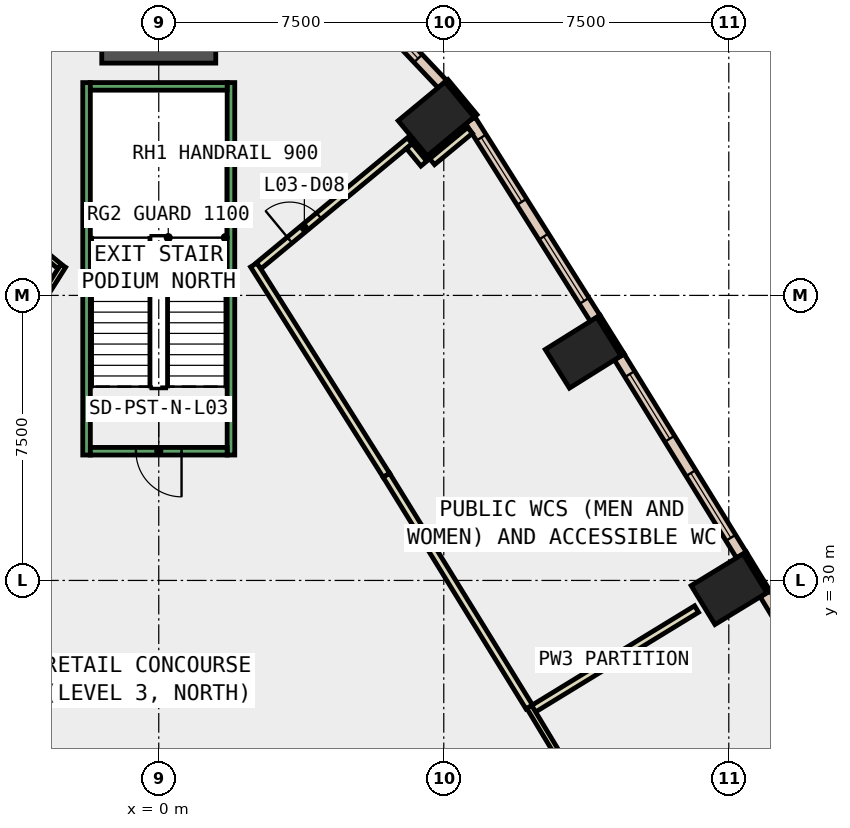
"""IFC4 building model, lengths in metres.
Left out: names, types, materials, properties, quantities, classifications, styles, units other than length and angle.
Written with IfcOpenShell. Run it as: python <this file> out.ifc"""

import sys

from ifc_helpers import new_model, si_unit, direction, frame, frame_2d, origin, origin_2d, place, context, subcontext, project, spatial, rectangle, extrude, element, fill, save


model = new_model("IFC4")
c1 = context("Model", 3, precision=1e-05, world=origin(), true_north=direction((0.0, 1.0)))
c2 = subcontext(c1, "Body", "Model", "MODEL_VIEW")
j1 = project(units=[si_unit("LENGTHUNIT", "METRE"), si_unit("PLANEANGLEUNIT", "RADIAN")], contexts=[c1])
p1 = place(None, origin())
s1 = spatial("IfcSite", under=j1, at=p1, CompositionType="ELEMENT")
p2 = place(p1, origin())
s2 = spatial("IfcBuilding", under=s1, at=p2, CompositionType="ELEMENT")
p3 = place(p2, frame((0.0, 0.0, 20.0)))
s3 = spatial("IfcBuildingStorey", under=s2, at=p3, CompositionType="ELEMENT", Elevation=20.0)
for number, where, z_axis, x_axis in (
    (1, (15.005, 29.769, -0.45), (0.0, 0.0, 1.0), (-0.522, 0.853, 0.0)),
    (2, (11.167, 35.993, -0.45), (0.0, 0.0, 1.0), (-0.53, 0.848, 0.0)),
    (3, (7.299, 42.144, -0.45), (0.0, 0.0, 1.0), (-0.638, 0.77, 0.0)),
):
    element("IfcColumn", number, at=place(p3, frame(where, z_axis=z_axis, x_axis=x_axis)), inside=s3, PredefinedType="COLUMN", context=c2, shape_type="SweptSolid", body=[
        extrude(rectangle(XDim=1.2, YDim=1.6, at=origin_2d()), origin(), (0.0, 0.0, 1.0), 5.0),
    ])
p4 = place(p3, frame((0.0, 45.112, -0.45), z_axis=(0.0, 0.0, 1.0), x_axis=(0.0, 1.0, 0.0)))
e4 = element("IfcColumn", 4, at=p4, inside=s3, PredefinedType="COLUMN", context=c2, shape_type="SweptSolid", body=[
    extrude(rectangle(XDim=3.0, YDim=3.0, at=origin_2d()), origin(), (0.0, 0.0, 1.0), 5.0),
])
p5 = place(p3, frame((16.043, 29.7, 0.0), z_axis=(0.0, 0.0, 1.0), x_axis=(-0.521507599072, 0.853246637327, 0.0)))
e5 = element("IfcWall", 5, at=p5, inside=s3, PredefinedType="STANDARD", context=c2, shape_type="SweptSolid", body=[
    extrude(rectangle(XDim=1.2, YDim=0.1, at=frame_2d((0.6, 0.0))), origin(), (0.0, 0.0, 1.0), 4.55),
])
for number, where, z_axis, x_axis in (
    (6, (12.206, 35.935, 0.0), (0.0, 0.0, 1.0), (-0.53, 0.848, 0.0)),
    (7, (8.336, 42.224, 0.0), (0.0, 0.0, 1.0), (-0.638, 0.77, 0.0)),
):
    element("IfcWall", number, at=place(p3, frame(where, z_axis=z_axis, x_axis=x_axis)), inside=s3, PredefinedType="STANDARD", context=c2, shape_type="SweptSolid", body=[
        extrude(rectangle(XDim=1.199, YDim=0.1, at=frame_2d((0.6, 0.0))), origin(), (0.0, 0.0, 1.0), 4.55),
    ])
p6 = place(p3, frame((19.117, 24.406, 0.0), z_axis=(0.0, 0.0, 1.0), x_axis=(-0.516687651362, 0.85617397235, 0.0)))
e8 = element("IfcWall", 8, at=p6, inside=s3, PredefinedType="STANDARD", context=c2, shape_type="SweptSolid", body=[
    extrude(rectangle(XDim=6.121, YDim=0.3, at=frame_2d((3.061, 0.0))), origin(), (0.0, 0.0, 1.0), 4.55),
])
p7 = place(p6, frame((0.53, 0.0, 1.0)))
e9 = element("IfcOpeningElement", 9, at=p7, cuts=e8, PredefinedType="OPENING", context=c2, shape_type="SweptSolid", body=[
    extrude(rectangle(XDim=2.0, YDim=3.2, at=frame_2d((1.0, 1.6))), frame((0.0, 0.16, 0.0), z_axis=(0.0, -1.0, 0.0), x_axis=(1.0, 0.0, 0.0)), (0.0, 0.0, 1.0), 0.32),
])
p8 = place(p6, frame((3.591, 0.0, 1.0)))
e10 = element("IfcOpeningElement", 10, at=p8, cuts=e8, PredefinedType="OPENING", context=c2, shape_type="SweptSolid", body=[
    extrude(rectangle(XDim=2.0, YDim=3.2, at=frame_2d((1.0, 1.6))), frame((0.0, 0.16, 0.0), z_axis=(0.0, -1.0, 0.0), x_axis=(1.0, 0.0, 0.0)), (0.0, 0.0, 1.0), 0.32),
])
p9 = place(p3, frame((15.331, 30.67, 0.0), z_axis=(0.0, 0.0, 1.0), x_axis=(-0.524953701886, 0.85113078365, 0.0)))
e11 = element("IfcWall", 11, at=p9, inside=s3, PredefinedType="STANDARD", context=c2, shape_type="SweptSolid", body=[
    extrude(rectangle(XDim=6.123, YDim=0.3, at=frame_2d((3.061, 0.0))), origin(), (0.0, 0.0, 1.0), 4.55),
])
p10 = place(p9, frame((0.531, 0.0, 1.0)))
e12 = element("IfcOpeningElement", 12, at=p10, cuts=e11, PredefinedType="OPENING", context=c2, shape_type="SweptSolid", body=[
    extrude(rectangle(XDim=2.0, YDim=3.2, at=frame_2d((1.0, 1.6))), frame((0.0, 0.16, 0.0), z_axis=(0.0, -1.0, 0.0), x_axis=(1.0, 0.0, 0.0)), (0.0, 0.0, 1.0), 0.32),
])
p11 = place(p9, frame((3.592, 0.0, 1.0)))
e13 = element("IfcOpeningElement", 13, at=p11, cuts=e11, PredefinedType="OPENING", context=c2, shape_type="SweptSolid", body=[
    extrude(rectangle(XDim=2.0, YDim=3.2, at=frame_2d((1.0, 1.6))), frame((0.0, 0.16, 0.0), z_axis=(0.0, -1.0, 0.0), x_axis=(1.0, 0.0, 0.0)), (0.0, 0.0, 1.0), 0.32),
])
p12 = place(p3, frame((11.483, 36.897, 0.0), z_axis=(0.0, 0.0, 1.0), x_axis=(-0.53304020879, 0.846089910006, 0.0)))
e14 = element("IfcWall", 14, at=p12, inside=s3, PredefinedType="STANDARD", context=c2, shape_type="SweptSolid", body=[
    extrude(rectangle(XDim=6.163, YDim=0.3, at=frame_2d((3.081, 0.0))), origin(), (0.0, 0.0, 1.0), 4.55),
])
p13 = place(p12, frame((0.541, 0.0, 1.0)))
e15 = element("IfcOpeningElement", 15, at=p13, cuts=e14, PredefinedType="OPENING", context=c2, shape_type="SweptSolid", body=[
    extrude(rectangle(XDim=2.0, YDim=3.2, at=frame_2d((1.0, 1.6))), frame((0.0, 0.16, 0.0), z_axis=(0.0, -1.0, 0.0), x_axis=(1.0, 0.0, 0.0)), (0.0, 0.0, 1.0), 0.32),
])
p14 = place(p12, frame((3.622, 0.0, 1.0)))
e16 = element("IfcOpeningElement", 16, at=p14, cuts=e14, PredefinedType="OPENING", context=c2, shape_type="SweptSolid", body=[
    extrude(rectangle(XDim=2.0, YDim=3.2, at=frame_2d((1.0, 1.6))), frame((0.0, 0.16, 0.0), z_axis=(0.0, -1.0, 0.0), x_axis=(1.0, 0.0, 0.0)), (0.0, 0.0, 1.0), 0.32),
])
p15 = place(p3, frame((7.464, 43.058, 0.0), z_axis=(0.0, 0.0, 1.0), x_axis=(-0.687081126245, 0.726580708495, 0.0)))
e17 = element("IfcWall", 17, at=p15, inside=s3, PredefinedType="STANDARD", context=c2, shape_type="SweptSolid", body=[
    extrude(rectangle(XDim=3.461, YDim=0.3, at=frame_2d((1.73, 0.0))), origin(), (0.0, 0.0, 1.0), 4.55),
])
p16 = place(p15, frame((0.931, 0.0, 1.0)))
e18 = element("IfcOpeningElement", 18, at=p16, cuts=e17, PredefinedType="OPENING", context=c2, shape_type="SweptSolid", body=[
    extrude(rectangle(XDim=1.6, YDim=3.2, at=frame_2d((0.8, 1.6))), frame((0.0, 0.16, 0.0), z_axis=(0.0, -1.0, 0.0), x_axis=(1.0, 0.0, 0.0)), (0.0, 0.0, 1.0), 0.32),
])
p17 = place(p3, frame((9.801, 26.587, 0.0), z_axis=(0.0, 0.0, 1.0), x_axis=(0.853180048432, 0.521616530564, 0.0)))
e19 = element("IfcWall", 19, at=p17, inside=s3, PredefinedType="PARTITIONING", context=c2, shape_type="SweptSolid", body=[
    extrude(rectangle(XDim=5.1, YDim=0.2, at=frame_2d((2.55, 0.0))), origin(), (0.0, 0.0, 1.0), 4.55),
])
p18 = place(p3, frame((13.544, 20.382, 0.0), z_axis=(0.0, 0.0, 1.0), x_axis=(-0.516527204033, 0.856270779306, 0.0)))
e20 = element("IfcWall", 20, at=p18, inside=s3, PredefinedType="PARTITIONING", context=c2, shape_type="SweptSolid", body=[
    extrude(rectangle(XDim=7.347, YDim=0.15, at=frame_2d((3.673, 0.0))), origin(), (0.0, 0.0, 1.0), 4.55),
])
p19 = place(p3, frame((5.99, 32.767, 0.0), z_axis=(0.0, 0.0, 1.0), x_axis=(-0.533258548208, 0.845952315892, 0.0)))
e21 = element("IfcWall", 21, at=p19, inside=s3, PredefinedType="PARTITIONING", context=c2, shape_type="SweptSolid", body=[
    extrude(rectangle(XDim=6.543, YDim=0.2, at=frame_2d((3.271, 0.0))), origin(), (0.0, 0.0, 1.0), 4.55),
])
p20 = place(p3, frame((2.631, 38.281, 0.0), z_axis=(0.0, 0.0, 1.0), x_axis=(0.770346235272, 0.637625813312, 0.0)))
e22 = element("IfcWall", 22, at=p20, inside=s3, PredefinedType="PARTITIONING", context=c2, shape_type="SweptSolid", body=[
    extrude(rectangle(XDim=5.16, YDim=0.2, at=frame_2d((2.58, 0.0))), origin(), (0.0, 0.0, 1.0), 4.55),
])
p21 = place(p20, frame((1.058, 0.0, 0.0)))
e23 = element("IfcOpeningElement", 23, at=p21, cuts=e22, PredefinedType="OPENING", context=c2, shape_type="SweptSolid", body=[
    extrude(rectangle(XDim=1.0, YDim=2.1, at=frame_2d((0.5, 1.05))), frame((0.0, 0.11, 0.0), z_axis=(0.0, -1.0, 0.0), x_axis=(1.0, 0.0, 0.0)), (0.0, 0.0, 1.0), 0.22),
])
p22 = place(p3, frame((6.593, 41.43, 0.0), z_axis=(0.0, 0.0, 1.0), x_axis=(0.636576557089, -0.771213515808, 0.0)))
e24 = element("IfcWall", 24, at=p22, inside=s3, PredefinedType="PARTITIONING", context=c2, shape_type="SweptSolid", body=[
    extrude(rectangle(XDim=0.6, YDim=0.2, at=frame_2d((0.3, 0.0))), origin(), (0.0, 0.0, 1.0), 4.55),
])
p23 = place(p3, frame((7.193, 41.018, 0.0), z_axis=(0.0, 0.0, 1.0), x_axis=(0.77046149962, 0.637486531311, 0.0)))
e25 = element("IfcWall", 25, at=p23, inside=s3, PredefinedType="PARTITIONING", context=c2, shape_type="SweptSolid", body=[
    extrude(rectangle(XDim=1.292, YDim=0.2, at=frame_2d((0.646, 0.0))), origin(), (0.0, 0.0, 1.0), 4.55),
])
p24 = place(p3, frame((9.748, 26.672, 0.0), z_axis=(0.0, 0.0, 1.0), x_axis=(-0.52483723921, 0.851202603578, 0.0)))
e26 = element("IfcWall", 26, at=p24, inside=s3, PredefinedType="PARTITIONING", context=c2, shape_type="SweptSolid", body=[
    extrude(rectangle(XDim=7.16, YDim=0.2, at=frame_2d((3.58, 0.0))), origin(), (0.0, 0.0, 1.0), 4.55),
])
p25 = place(p3, frame((-2.514, 38.28, 0.0), z_axis=(0.0, 0.0, 1.0), x_axis=(-0.533358613661, -0.845889229884, 0.0)))
e27 = element("IfcWall", 27, at=p25, inside=s3, PredefinedType="PARTITIONING", context=c2, shape_type="SweptSolid", body=[
    extrude(rectangle(XDim=6.517, YDim=0.15, at=frame_2d((3.259, 0.0))), origin(), (0.0, 0.0, 1.0), 4.55),
])
p26 = place(p3, frame((-6.667, 41.621, 0.0), z_axis=(0.0, 0.0, 1.0), x_axis=(0.770357397594, -0.637612327336, 0.0)))
e28 = element("IfcWall", 28, at=p26, inside=s3, PredefinedType="PARTITIONING", context=c2, shape_type="SweptSolid", body=[
    extrude(rectangle(XDim=5.264, YDim=0.15, at=frame_2d((2.632, 0.0))), origin(), (0.0, 0.0, 1.0), 4.55),
])
p27 = place(p26, frame((0.1, 0.0, 0.0)))
e29 = element("IfcOpeningElement", 29, at=p27, cuts=e28, PredefinedType="OPENING", context=c2, shape_type="SweptSolid", body=[
    extrude(rectangle(XDim=1.8, YDim=2.1, at=frame_2d((0.9, 1.05))), frame((0.0, 0.085, 0.0), z_axis=(0.0, -1.0, 0.0), x_axis=(1.0, 0.0, 0.0)), (0.0, 0.0, 1.0), 0.17),
])
for number, where, z_axis, x_axis in (
    (30, (1.9, 33.3, 0.0), (0.0, 0.0, 1.0), (0.0, 1.0, 0.0)),
    (31, (-1.9, 33.3, 0.0), (0.0, 0.0, 1.0), (0.0, 1.0, 0.0)),
):
    element("IfcWall", number, at=place(p3, frame(where, z_axis=z_axis, x_axis=x_axis)), inside=s3, PredefinedType="STANDARD", context=c2, shape_type="SweptSolid", body=[
        extrude(rectangle(XDim=9.8, YDim=0.2, at=frame_2d((4.9, 0.0))), origin(), (0.0, 0.0, 1.0), 4.55),
    ])
p28 = place(p3, frame((1.8, 33.4, 0.0), z_axis=(0.0, 0.0, 1.0), x_axis=(-1.0, 0.0, 0.0)))
e32 = element("IfcWall", 32, at=p28, inside=s3, PredefinedType="STANDARD", context=c2, shape_type="SweptSolid", body=[
    extrude(rectangle(XDim=3.6, YDim=0.2, at=frame_2d((1.8, 0.0))), origin(), (0.0, 0.0, 1.0), 4.55),
])
p29 = place(p28, frame((1.2, 0.0, 0.0)))
e33 = element("IfcOpeningElement", 33, at=p29, cuts=e32, PredefinedType="OPENING", context=c2, shape_type="SweptSolid", body=[
    extrude(rectangle(XDim=1.2, YDim=2.2, at=frame_2d((0.6, 1.1))), frame((0.0, 0.11, 0.0), z_axis=(0.0, -1.0, 0.0), x_axis=(1.0, 0.0, 0.0)), (0.0, 0.0, 1.0), 0.22),
])
p30 = place(p3, frame((1.8, 43.0, 0.0), z_axis=(0.0, 0.0, 1.0), x_axis=(-1.0, 0.0, 0.0)))
e34 = element("IfcWall", 34, at=p30, inside=s3, PredefinedType="STANDARD", context=c2, shape_type="SweptSolid", body=[
    extrude(rectangle(XDim=3.6, YDim=0.2, at=frame_2d((1.8, 0.0))), origin(), (0.0, 0.0, 1.0), 4.55),
])
p31 = place(p10, origin())
e35 = element("IfcWindow", 35, at=p31, inside=s3, PartitioningType="SINGLE_PANEL", PredefinedType="WINDOW", context=c2, shape_type="SweptSolid", body=[
    extrude(rectangle(XDim=2.0, YDim=3.2, at=frame_2d((1.0, 1.6))), frame((0.0, 0.03, 0.0), z_axis=(0.0, -1.0, 0.0), x_axis=(1.0, 0.0, 0.0)), (0.0, 0.0, 1.0), 0.06),
])
fill(e12, e35)
p32 = place(p11, origin())
e36 = element("IfcWindow", 36, at=p32, inside=s3, PartitioningType="SINGLE_PANEL", PredefinedType="WINDOW", context=c2, shape_type="SweptSolid", body=[
    extrude(rectangle(XDim=2.0, YDim=3.2, at=frame_2d((1.0, 1.6))), frame((0.0, 0.03, 0.0), z_axis=(0.0, -1.0, 0.0), x_axis=(1.0, 0.0, 0.0)), (0.0, 0.0, 1.0), 0.06),
])
fill(e13, e36)
p33 = place(p13, origin())
e37 = element("IfcWindow", 37, at=p33, inside=s3, PartitioningType="SINGLE_PANEL", PredefinedType="WINDOW", context=c2, shape_type="SweptSolid", body=[
    extrude(rectangle(XDim=2.0, YDim=3.2, at=frame_2d((1.0, 1.6))), frame((0.0, 0.03, 0.0), z_axis=(0.0, -1.0, 0.0), x_axis=(1.0, 0.0, 0.0)), (0.0, 0.0, 1.0), 0.06),
])
fill(e15, e37)
p34 = place(p14, origin())
e38 = element("IfcWindow", 38, at=p34, inside=s3, PartitioningType="SINGLE_PANEL", PredefinedType="WINDOW", context=c2, shape_type="SweptSolid", body=[
    extrude(rectangle(XDim=2.0, YDim=3.2, at=frame_2d((1.0, 1.6))), frame((0.0, 0.03, 0.0), z_axis=(0.0, -1.0, 0.0), x_axis=(1.0, 0.0, 0.0)), (0.0, 0.0, 1.0), 0.06),
])
fill(e16, e38)
p35 = place(p16, origin())
e39 = element("IfcWindow", 39, at=p35, inside=s3, PartitioningType="SINGLE_PANEL", PredefinedType="WINDOW", context=c2, shape_type="SweptSolid", body=[
    extrude(rectangle(XDim=1.6, YDim=3.2, at=frame_2d((0.8, 1.6))), frame((0.0, 0.03, 0.0), z_axis=(0.0, -1.0, 0.0), x_axis=(1.0, 0.0, 0.0)), (0.0, 0.0, 1.0), 0.06),
])
fill(e18, e39)
p36 = place(p21, origin())
e40 = element("IfcDoor", 40, at=p36, inside=s3, OperationType="SINGLE_SWING_LEFT", PredefinedType="DOOR", context=c2, shape_type="SweptSolid", body=[
    extrude(rectangle(XDim=1.0, YDim=2.1, at=frame_2d((0.5, 1.05))), frame((0.0, 0.025, 0.0), z_axis=(0.0, -1.0, 0.0), x_axis=(1.0, 0.0, 0.0)), (0.0, 0.0, 1.0), 0.05),
])
fill(e23, e40)
p37 = place(p29, origin())
e41 = element("IfcDoor", 41, at=p37, inside=s3, OperationType="SINGLE_SWING_LEFT", PredefinedType="DOOR", context=c2, shape_type="SweptSolid", body=[
    extrude(rectangle(XDim=1.2, YDim=2.2, at=frame_2d((0.6, 1.1))), frame((0.0, 0.025, 0.0), z_axis=(0.0, -1.0, 0.0), x_axis=(1.0, 0.0, 0.0)), (0.0, 0.0, 1.0), 0.05),
])
fill(e33, e41)
save(model, sys.argv[1])
